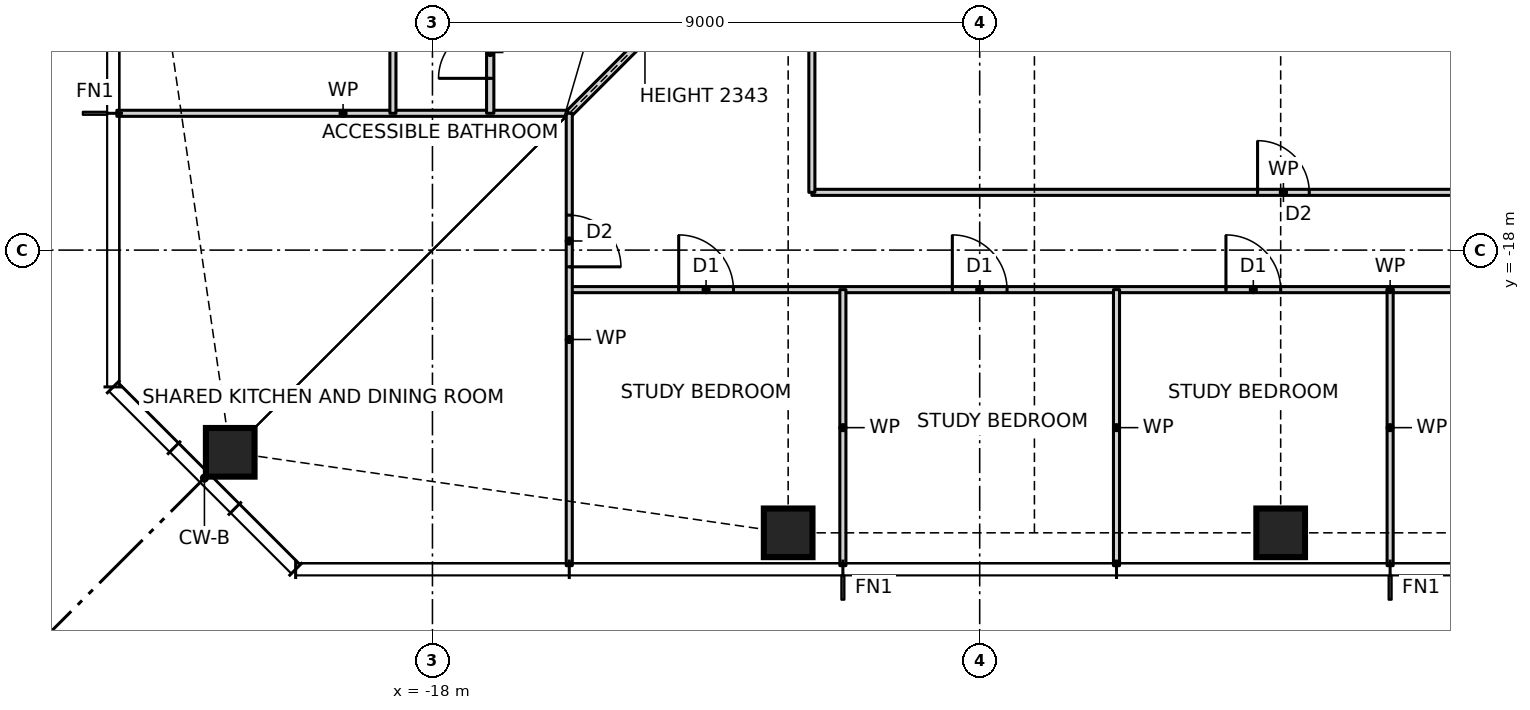
"""IFC4 building model, lengths in metres.
Left out: names, types, materials, properties, quantities, classifications, styles, units other than length and angle.
Written with IfcOpenShell. Run it as: python <this file> out.ifc"""

import sys

from ifc_helpers import new_model, si_unit, direction, frame, frame_2d, origin, origin_2d, place, context, subcontext, project, spatial, rectangle, hollow_rectangle, extrude, element, fill, save


model = new_model("IFC4")
c1 = context("Model", 3, precision=1e-05, world=origin(), true_north=direction((0.0, 1.0)))
c2 = subcontext(c1, "Body", "Model", "MODEL_VIEW")
j1 = project(units=[si_unit("LENGTHUNIT", "METRE"), si_unit("PLANEANGLEUNIT", "RADIAN")], contexts=[c1])
p1 = place(None, origin())
s1 = spatial("IfcSite", under=j1, at=p1, CompositionType="ELEMENT")
p2 = place(p1, origin())
s2 = spatial("IfcBuilding", under=s1, at=p2, CompositionType="ELEMENT")
p3 = place(p2, frame((0.0, 0.0, 25.5)))
s3 = spatial("IfcBuildingStorey", under=s2, at=p3, CompositionType="ELEMENT", Elevation=25.5)
for number, where, z_axis, x_axis in (
    (1, (-21.326, -21.326, 0.0), (0.0, 0.0, 1.0), (1.0, 0.0, 0.0)),
    (2, (-12.15, -22.65, 0.0), (0.0, 0.0, 1.0), (1.0, 0.0, 0.0)),
    (3, (-4.05, -22.65, 0.0), (0.0, 0.0, 1.0), (1.0, 0.0, 0.0)),
):
    element("IfcColumn", number, at=place(p3, frame(where, z_axis=z_axis, x_axis=x_axis)), inside=s3, PredefinedType="COLUMN", context=c2, shape_type="SweptSolid", body=[
        extrude(hollow_rectangle(XDim=0.8, YDim=0.8, WallThickness=0.09, at=origin_2d()), origin(), (0.0, 0.0, 1.0), 3.5),
    ])
p4 = place(p3, frame((-15.75, -18.65, 0.0), z_axis=(0.0, 0.0, 1.0), x_axis=(1.0, 0.0, 0.0)))
e4 = element("IfcWall", 4, at=p4, inside=s3, PredefinedType="PARTITIONING", context=c2, shape_type="SweptSolid", body=[
    extrude(rectangle(XDim=27.0, YDim=0.1, at=frame_2d((13.5, 0.0))), origin(), (0.0, 0.0, 1.0), 3.27),
])
p5 = place(p4, frame((1.8, 0.0, 0.0)))
e5 = element("IfcOpeningElement", 5, at=p5, cuts=e4, PredefinedType="OPENING", context=c2, shape_type="SweptSolid", body=[
    extrude(rectangle(XDim=0.9, YDim=2.1, at=frame_2d((0.45, 1.05))), frame((0.0, 0.06, 0.0), z_axis=(0.0, -1.0, 0.0), x_axis=(1.0, 0.0, 0.0)), (0.0, 0.0, 1.0), 0.12),
])
p6 = place(p4, frame((6.3, 0.0, 0.0)))
e6 = element("IfcOpeningElement", 6, at=p6, cuts=e4, PredefinedType="OPENING", context=c2, shape_type="SweptSolid", body=[
    extrude(rectangle(XDim=0.9, YDim=2.1, at=frame_2d((0.45, 1.05))), frame((0.0, 0.06, 0.0), z_axis=(0.0, -1.0, 0.0), x_axis=(1.0, 0.0, 0.0)), (0.0, 0.0, 1.0), 0.12),
])
p7 = place(p4, frame((10.8, 0.0, 0.0)))
e7 = element("IfcOpeningElement", 7, at=p7, cuts=e4, PredefinedType="OPENING", context=c2, shape_type="SweptSolid", body=[
    extrude(rectangle(XDim=0.9, YDim=2.1, at=frame_2d((0.45, 1.05))), frame((0.0, 0.06, 0.0), z_axis=(0.0, -1.0, 0.0), x_axis=(1.0, 0.0, 0.0)), (0.0, 0.0, 1.0), 0.12),
])
p8 = place(p4, frame((15.3, 0.0, 0.0)))
e8 = element("IfcOpeningElement", 8, at=p8, cuts=e4, PredefinedType="OPENING", context=c2, shape_type="SweptSolid", body=[
    extrude(rectangle(XDim=0.9, YDim=2.1, at=frame_2d((0.45, 1.05))), frame((0.0, 0.06, 0.0), z_axis=(0.0, -1.0, 0.0), x_axis=(1.0, 0.0, 0.0)), (0.0, 0.0, 1.0), 0.12),
])
p9 = place(p4, frame((19.8, 0.0, 0.0)))
e9 = element("IfcOpeningElement", 9, at=p9, cuts=e4, PredefinedType="OPENING", context=c2, shape_type="SweptSolid", body=[
    extrude(rectangle(XDim=0.9, YDim=2.1, at=frame_2d((0.45, 1.05))), frame((0.0, 0.06, 0.0), z_axis=(0.0, -1.0, 0.0), x_axis=(1.0, 0.0, 0.0)), (0.0, 0.0, 1.0), 0.12),
])
p10 = place(p4, frame((24.3, 0.0, 0.0)))
e10 = element("IfcOpeningElement", 10, at=p10, cuts=e4, PredefinedType="OPENING", context=c2, shape_type="SweptSolid", body=[
    extrude(rectangle(XDim=0.9, YDim=2.1, at=frame_2d((0.45, 1.05))), frame((0.0, 0.06, 0.0), z_axis=(0.0, -1.0, 0.0), x_axis=(1.0, 0.0, 0.0)), (0.0, 0.0, 1.0), 0.12),
])
p11 = place(p3, frame((-11.76, -17.05, 0.0), z_axis=(0.0, 0.0, 1.0), x_axis=(1.0, 0.0, 0.0)))
e11 = element("IfcWall", 11, at=p11, inside=s3, PredefinedType="PARTITIONING", context=c2, shape_type="SweptSolid", body=[
    extrude(rectangle(XDim=15.51, YDim=0.1, at=frame_2d((7.755, 0.0))), origin(), (0.0, 0.0, 1.0), 3.27),
])
p12 = place(p11, frame((7.33, 0.0, 0.0)))
e12 = element("IfcOpeningElement", 12, at=p12, cuts=e11, PredefinedType="OPENING", context=c2, shape_type="SweptSolid", body=[
    extrude(rectangle(XDim=0.85, YDim=2.1, at=frame_2d((0.425, 1.05))), frame((0.0, 0.06, 0.0), z_axis=(0.0, -1.0, 0.0), x_axis=(1.0, 0.0, 0.0)), (0.0, 0.0, 1.0), 0.12),
])
p13 = place(p3, frame((-23.19, -15.75, 0.0), z_axis=(0.0, 0.0, 1.0), x_axis=(1.0, 0.0, 0.0)))
e13 = element("IfcWall", 13, at=p13, inside=s3, PredefinedType="PARTITIONING", context=c2, shape_type="SweptSolid", body=[
    extrude(rectangle(XDim=7.44, YDim=0.1, at=frame_2d((3.72, 0.0))), origin(), (0.0, 0.0, 1.0), 3.27),
])
p14 = place(p3, frame((-15.75, -15.75, 0.0), z_axis=(0.0, 0.0, 1.0), x_axis=(0.707106781187, 0.707106781187, 0.0)))
e14 = element("IfcWall", 14, at=p14, inside=s3, PredefinedType="PARTITIONING", context=c2, shape_type="SweptSolid", body=[
    extrude(rectangle(XDim=5.869, YDim=0.12, at=frame_2d((2.935, 0.0))), origin(), (0.0, 0.0, 1.0), 2.343),
])
for number, where, z_axis, x_axis in (
    (15, (-2.25, -23.19, 0.0), (0.0, 0.0, 1.0), (0.0, 1.0, 0.0)),
    (16, (-6.75, -23.19, 0.0), (0.0, 0.0, 1.0), (0.0, 1.0, 0.0)),
    (17, (-11.25, -23.19, 0.0), (0.0, 0.0, 1.0), (0.0, 1.0, 0.0)),
):
    element("IfcWall", number, at=place(p3, frame(where, z_axis=z_axis, x_axis=x_axis)), inside=s3, PredefinedType="PARTITIONING", context=c2, shape_type="SweptSolid", body=[
        extrude(rectangle(XDim=4.54, YDim=0.1, at=frame_2d((2.27, 0.0))), origin(), (0.0, 0.0, 1.0), 3.27),
    ])
p15 = place(p3, frame((-11.76, -17.05, 0.0), z_axis=(0.0, 0.0, 1.0), x_axis=(0.0, 1.0, 0.0)))
e18 = element("IfcWall", 18, at=p15, inside=s3, PredefinedType="PARTITIONING", context=c2, shape_type="SweptSolid", body=[
    extrude(rectangle(XDim=5.29, YDim=0.1, at=frame_2d((2.645, 0.0))), origin(), (0.0, 0.0, 1.0), 3.27),
])
p16 = place(p3, frame((-15.75, -23.19, 0.0), z_axis=(0.0, 0.0, 1.0), x_axis=(0.0, 1.0, 0.0)))
e19 = element("IfcWall", 19, at=p16, inside=s3, PredefinedType="PARTITIONING", context=c2, shape_type="SweptSolid", body=[
    extrude(rectangle(XDim=7.44, YDim=0.1, at=frame_2d((3.72, 0.0))), origin(), (0.0, 0.0, 1.0), 3.27),
])
p17 = place(p16, frame((4.915, 0.0, 0.0)))
e20 = element("IfcOpeningElement", 20, at=p17, cuts=e19, PredefinedType="OPENING", context=c2, shape_type="SweptSolid", body=[
    extrude(rectangle(XDim=0.85, YDim=2.1, at=frame_2d((0.425, 1.05))), frame((0.0, 0.06, 0.0), z_axis=(0.0, -1.0, 0.0), x_axis=(1.0, 0.0, 0.0)), (0.0, 0.0, 1.0), 0.12),
])
p18 = place(p3, frame((-17.05, -15.75, 0.0), z_axis=(0.0, 0.0, 1.0), x_axis=(0.0, 1.0, 0.0)))
e21 = element("IfcWall", 21, at=p18, inside=s3, PredefinedType="PARTITIONING", context=c2, shape_type="SweptSolid", body=[
    extrude(rectangle(XDim=5.1, YDim=0.12, at=frame_2d((2.55, 0.0))), origin(), (0.0, 0.0, 1.0), 3.27),
])
p19 = place(p18, frame((2.375, 0.0, 0.0)))
e22 = element("IfcOpeningElement", 22, at=p19, cuts=e21, PredefinedType="OPENING", context=c2, shape_type="SweptSolid", body=[
    extrude(rectangle(XDim=0.85, YDim=2.1, at=frame_2d((0.425, 1.05))), frame((0.0, 0.07, 0.0), z_axis=(0.0, -1.0, 0.0), x_axis=(1.0, 0.0, 0.0)), (0.0, 0.0, 1.0), 0.14),
])
p20 = place(p18, frame((0.575, 0.0, 0.0)))
e23 = element("IfcOpeningElement", 23, at=p20, cuts=e21, PredefinedType="OPENING", context=c2, shape_type="SweptSolid", body=[
    extrude(rectangle(XDim=0.85, YDim=2.1, at=frame_2d((0.425, 1.05))), frame((0.0, 0.07, 0.0), z_axis=(0.0, -1.0, 0.0), x_axis=(1.0, 0.0, 0.0)), (0.0, 0.0, 1.0), 0.14),
])
p21 = place(p3, frame((-18.65, -15.75, 0.0), z_axis=(0.0, 0.0, 1.0), x_axis=(0.0, 1.0, 0.0)))
e24 = element("IfcWall", 24, at=p21, inside=s3, PredefinedType="PARTITIONING", context=c2, shape_type="SweptSolid", body=[
    extrude(rectangle(XDim=31.5, YDim=0.1, at=frame_2d((15.75, 0.0))), origin(), (0.0, 0.0, 1.0), 3.27),
])
p22 = place(p21, frame((28.8, 0.0, 0.0)))
e25 = element("IfcOpeningElement", 25, at=p22, cuts=e24, PredefinedType="OPENING", context=c2, shape_type="SweptSolid", body=[
    extrude(rectangle(XDim=0.9, YDim=2.1, at=frame_2d((0.45, 1.05))), frame((0.0, 0.06, 0.0), z_axis=(0.0, -1.0, 0.0), x_axis=(1.0, 0.0, 0.0)), (0.0, 0.0, 1.0), 0.12),
])
p23 = place(p21, frame((24.3, 0.0, 0.0)))
e26 = element("IfcOpeningElement", 26, at=p23, cuts=e24, PredefinedType="OPENING", context=c2, shape_type="SweptSolid", body=[
    extrude(rectangle(XDim=0.9, YDim=2.1, at=frame_2d((0.45, 1.05))), frame((0.0, 0.06, 0.0), z_axis=(0.0, -1.0, 0.0), x_axis=(1.0, 0.0, 0.0)), (0.0, 0.0, 1.0), 0.12),
])
p24 = place(p21, frame((19.8, 0.0, 0.0)))
e27 = element("IfcOpeningElement", 27, at=p24, cuts=e24, PredefinedType="OPENING", context=c2, shape_type="SweptSolid", body=[
    extrude(rectangle(XDim=0.9, YDim=2.1, at=frame_2d((0.45, 1.05))), frame((0.0, 0.06, 0.0), z_axis=(0.0, -1.0, 0.0), x_axis=(1.0, 0.0, 0.0)), (0.0, 0.0, 1.0), 0.12),
])
p25 = place(p21, frame((15.3, 0.0, 0.0)))
e28 = element("IfcOpeningElement", 28, at=p25, cuts=e24, PredefinedType="OPENING", context=c2, shape_type="SweptSolid", body=[
    extrude(rectangle(XDim=0.9, YDim=2.1, at=frame_2d((0.45, 1.05))), frame((0.0, 0.06, 0.0), z_axis=(0.0, -1.0, 0.0), x_axis=(1.0, 0.0, 0.0)), (0.0, 0.0, 1.0), 0.12),
])
p26 = place(p21, frame((10.8, 0.0, 0.0)))
e29 = element("IfcOpeningElement", 29, at=p26, cuts=e24, PredefinedType="OPENING", context=c2, shape_type="SweptSolid", body=[
    extrude(rectangle(XDim=0.9, YDim=2.1, at=frame_2d((0.45, 1.05))), frame((0.0, 0.06, 0.0), z_axis=(0.0, -1.0, 0.0), x_axis=(1.0, 0.0, 0.0)), (0.0, 0.0, 1.0), 0.12),
])
p27 = place(p21, frame((6.3, 0.0, 0.0)))
e30 = element("IfcOpeningElement", 30, at=p27, cuts=e24, PredefinedType="OPENING", context=c2, shape_type="SweptSolid", body=[
    extrude(rectangle(XDim=0.9, YDim=2.1, at=frame_2d((0.45, 1.05))), frame((0.0, 0.06, 0.0), z_axis=(0.0, -1.0, 0.0), x_axis=(1.0, 0.0, 0.0)), (0.0, 0.0, 1.0), 0.12),
])
p28 = place(p21, frame((1.8, 0.0, 0.0)))
e31 = element("IfcOpeningElement", 31, at=p28, cuts=e24, PredefinedType="OPENING", context=c2, shape_type="SweptSolid", body=[
    extrude(rectangle(XDim=0.9, YDim=2.1, at=frame_2d((0.45, 1.05))), frame((0.0, 0.06, 0.0), z_axis=(0.0, -1.0, 0.0), x_axis=(1.0, 0.0, 0.0)), (0.0, 0.0, 1.0), 0.12),
])
p29 = place(p5, origin())
e32 = element("IfcDoor", 32, at=p29, inside=s3, OperationType="SINGLE_SWING_LEFT", PredefinedType="DOOR", context=c2, shape_type="SweptSolid", body=[
    extrude(rectangle(XDim=0.9, YDim=2.1, at=frame_2d((0.45, 1.05))), frame((0.0, 0.025, 0.0), z_axis=(0.0, -1.0, 0.0), x_axis=(1.0, 0.0, 0.0)), (0.0, 0.0, 1.0), 0.05),
])
fill(e5, e32)
p30 = place(p6, origin())
e33 = element("IfcDoor", 33, at=p30, inside=s3, OperationType="SINGLE_SWING_LEFT", PredefinedType="DOOR", context=c2, shape_type="SweptSolid", body=[
    extrude(rectangle(XDim=0.9, YDim=2.1, at=frame_2d((0.45, 1.05))), frame((0.0, 0.025, 0.0), z_axis=(0.0, -1.0, 0.0), x_axis=(1.0, 0.0, 0.0)), (0.0, 0.0, 1.0), 0.05),
])
fill(e6, e33)
p31 = place(p7, origin())
e34 = element("IfcDoor", 34, at=p31, inside=s3, OperationType="SINGLE_SWING_LEFT", PredefinedType="DOOR", context=c2, shape_type="SweptSolid", body=[
    extrude(rectangle(XDim=0.9, YDim=2.1, at=frame_2d((0.45, 1.05))), frame((0.0, 0.025, 0.0), z_axis=(0.0, -1.0, 0.0), x_axis=(1.0, 0.0, 0.0)), (0.0, 0.0, 1.0), 0.05),
])
fill(e7, e34)
p32 = place(p12, origin())
e35 = element("IfcDoor", 35, at=p32, inside=s3, OperationType="SINGLE_SWING_LEFT", PredefinedType="DOOR", context=c2, shape_type="SweptSolid", body=[
    extrude(rectangle(XDim=0.85, YDim=2.1, at=frame_2d((0.425, 1.05))), frame((0.0, 0.025, 0.0), z_axis=(0.0, -1.0, 0.0), x_axis=(1.0, 0.0, 0.0)), (0.0, 0.0, 1.0), 0.05),
])
fill(e12, e35)
p33 = place(p20, origin())
e36 = element("IfcDoor", 36, at=p33, inside=s3, OperationType="SINGLE_SWING_LEFT", PredefinedType="DOOR", context=c2, shape_type="SweptSolid", body=[
    extrude(rectangle(XDim=0.85, YDim=2.1, at=frame_2d((0.425, 1.05))), frame((0.0, 0.025, 0.0), z_axis=(0.0, -1.0, 0.0), x_axis=(1.0, 0.0, 0.0)), (0.0, 0.0, 1.0), 0.05),
])
fill(e23, e36)
p34 = place(p17, frame((0.85, 0.0, 0.0), z_axis=(0.0, 0.0, 1.0), x_axis=(-1.0, 0.0, 0.0)))
e37 = element("IfcDoor", 37, at=p34, inside=s3, OperationType="SINGLE_SWING_RIGHT", PredefinedType="DOOR", context=c2, shape_type="SweptSolid", body=[
    extrude(rectangle(XDim=0.85, YDim=2.1, at=frame_2d((0.425, 1.05))), frame((0.0, 0.025, 0.0), z_axis=(0.0, -1.0, 0.0), x_axis=(1.0, 0.0, 0.0)), (0.0, 0.0, 1.0), 0.05),
])
fill(e20, e37)
save(model, sys.argv[1])
